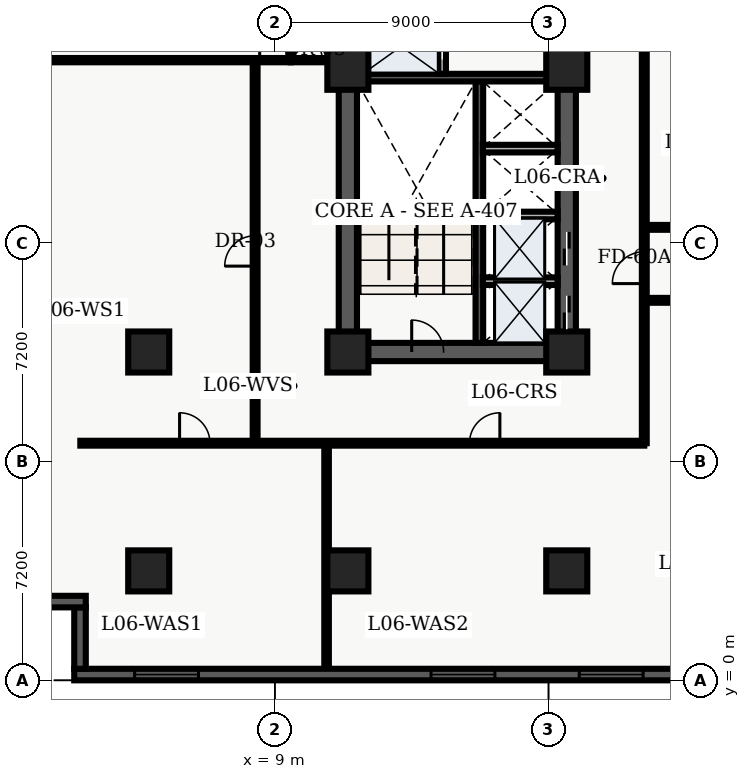
"""IFC4 building model, lengths in metres.
Left out: names, types, materials, properties, quantities, classifications, styles, units other than length and angle.
Written with IfcOpenShell. Run it as: python <this file> out.ifc"""

import sys

from ifc_helpers import new_model, entity, si_unit, converted_unit, direction, frame, origin_with_axes, origin_2d_with_axis, place, context, subcontext, project, spatial, polyline, rectangle, outline, extrude, element, fill, save


model = new_model("IFC4")
c1 = context("Model", 3, precision=1e-05, world=origin_with_axes(), true_north=direction((0.0, 1.0)))
c2 = subcontext(c1, "Body", "Model", "MODEL_VIEW")
j1 = project(units=[si_unit("LENGTHUNIT", "METRE"), converted_unit("PLANEANGLEUNIT", "DEGREE", entity("IfcPlaneAngleMeasure", 0.017), si_unit("PLANEANGLEUNIT", "RADIAN"), dimensions=[0, 0, 0, 0, 0, 0, 0])], contexts=[c1])
p1 = place(None, origin_with_axes())
s1 = spatial("IfcSite", under=j1, at=p1, CompositionType="ELEMENT")
p2 = place(p1, origin_with_axes())
s2 = spatial("IfcBuilding", under=s1, at=p2, CompositionType="ELEMENT")
p3 = place(p2, frame((0.0, 0.0, 28.8), z_axis=(0.0, 0.0, 1.0), x_axis=(1.0, 0.0, 0.0)))
s3 = spatial("IfcBuildingStorey", under=s2, at=p3, CompositionType="ELEMENT", Elevation=28.8)
p4 = place(p3, frame((11.4, 10.8, 0.0), z_axis=(0.0, 0.0, 1.0), x_axis=(0.0, 1.0, 0.0)))
e1 = element("IfcWall", 1, at=p4, inside=s3, PredefinedType="SHEAR", context=c2, shape_type="SweptSolid", body=[
    extrude(outline(polyline([(0.0, -0.3), (27.0, -0.3), (27.0, 0.3), (0.0, 0.3), (0.0, -0.3)])), origin_with_axes(), (0.0, 0.0, 1.0), 3.66),
])
p5 = place(p3, frame((11.4, 10.8, 0.0), z_axis=(0.0, 0.0, 1.0), x_axis=(1.0, 0.0, 0.0)))
e2 = element("IfcWall", 2, at=p5, inside=s3, PredefinedType="SHEAR", context=c2, shape_type="SweptSolid", body=[
    extrude(outline(polyline([(0.0, -0.3), (7.2, -0.3), (7.2, 0.3), (0.0, 0.3), (0.0, -0.3)])), origin_with_axes(), (0.0, 0.0, 1.0), 3.66),
])
p6 = place(p5, frame((2.625, 0.0, 0.0), z_axis=(0.0, 0.0, 1.0), x_axis=(1.0, 0.0, 0.0)))
e3 = element("IfcOpeningElement", 3, at=p6, cuts=e2, PredefinedType="OPENING", context=c2, shape_type="SweptSolid", body=[
    extrude(rectangle(XDim=1.05, YDim=0.62, at=origin_2d_with_axis()), origin_with_axes(), (0.0, 0.0, 1.0), 2.15),
])
p7 = place(p3, frame((18.6, 10.8, 0.0), z_axis=(0.0, 0.0, 1.0), x_axis=(0.0, 1.0, 0.0)))
e4 = element("IfcWall", 4, at=p7, inside=s3, PredefinedType="SHEAR", context=c2, shape_type="SweptSolid", body=[
    extrude(outline(polyline([(0.0, -0.3), (13.5, -0.3), (13.5, 0.3), (0.0, 0.3), (0.0, -0.3)])), origin_with_axes(), (0.0, 0.0, 1.0), 3.66),
])
p8 = place(p7, frame((1.3, 0.0, 0.0), z_axis=(0.0, 0.0, 1.0), x_axis=(1.0, 0.0, 0.0)))
e5 = element("IfcOpeningElement", 5, at=p8, cuts=e4, PredefinedType="OPENING", context=c2, shape_type="SweptSolid", body=[
    extrude(rectangle(XDim=1.1, YDim=0.62, at=origin_2d_with_axis()), origin_with_axes(), (0.0, 0.0, 1.0), 2.15),
])
p9 = place(p7, frame((3.4, 0.0, 0.0), z_axis=(0.0, 0.0, 1.0), x_axis=(1.0, 0.0, 0.0)))
e6 = element("IfcOpeningElement", 6, at=p9, cuts=e4, PredefinedType="OPENING", context=c2, shape_type="SweptSolid", body=[
    extrude(rectangle(XDim=1.1, YDim=0.62, at=origin_2d_with_axis()), origin_with_axes(), (0.0, 0.0, 1.0), 2.15),
])
p10 = place(p7, frame((11.125, 0.0, 0.0), z_axis=(0.0, 0.0, 1.0), x_axis=(1.0, 0.0, 0.0)))
e7 = element("IfcOpeningElement", 7, at=p10, cuts=e4, PredefinedType="OPENING", context=c2, shape_type="SweptSolid", body=[
    extrude(rectangle(XDim=1.05, YDim=0.62, at=origin_2d_with_axis()), origin_with_axes(), (0.0, 0.0, 1.0), 2.15),
])
p11 = place(p3, frame((15.725, 11.1, 0.0), z_axis=(0.0, 0.0, 1.0), x_axis=(0.0, 1.0, 0.0)))
e8 = element("IfcWall", 8, at=p11, inside=s3, PredefinedType="SHEAR", context=c2, shape_type="SweptSolid", body=[
    extrude(outline(polyline([(0.0, -0.125), (8.6, -0.125), (8.6, 0.125), (0.0, 0.125), (0.0, -0.125)])), origin_with_axes(), (0.0, 0.0, 1.0), 3.66),
])
p12 = place(p3, frame((11.7, 19.825, 0.0), z_axis=(0.0, 0.0, 1.0), x_axis=(1.0, 0.0, 0.0)))
e9 = element("IfcWall", 9, at=p12, inside=s3, PredefinedType="SHEAR", context=c2, shape_type="SweptSolid", body=[
    extrude(outline(polyline([(0.0, -0.125), (6.6, -0.125), (6.6, 0.125), (0.0, 0.125), (0.0, -0.125)])), origin_with_axes(), (0.0, 0.0, 1.0), 3.66),
])
p13 = place(p3, frame((14.5, 19.95, 0.0), z_axis=(0.0, 0.0, 1.0), x_axis=(0.0, 1.0, 0.0)))
e10 = element("IfcWall", 10, at=p13, inside=s3, PredefinedType="SOLIDWALL", context=c2, shape_type="SweptSolid", body=[
    extrude(outline(polyline([(0.0, -0.125), (6.25, -0.125), (6.25, 0.125), (0.0, 0.125), (0.0, -0.125)])), origin_with_axes(), (0.0, 0.0, 1.0), 2.7),
])
p14 = place(p13, frame((1.025, 0.0, 0.0), z_axis=(0.0, 0.0, 1.0), x_axis=(1.0, 0.0, 0.0)))
e11 = element("IfcOpeningElement", 11, at=p14, cuts=e10, PredefinedType="OPENING", context=c2, shape_type="SweptSolid", body=[
    extrude(rectangle(XDim=1.1, YDim=0.27, at=origin_2d_with_axis()), origin_with_axes(), (0.0, 0.0, 1.0), 2.15),
])
p15 = place(p13, frame((2.975, 0.0, 0.0), z_axis=(0.0, 0.0, 1.0), x_axis=(1.0, 0.0, 0.0)))
e12 = element("IfcOpeningElement", 12, at=p15, cuts=e10, PredefinedType="OPENING", context=c2, shape_type="SweptSolid", body=[
    extrude(rectangle(XDim=1.1, YDim=0.27, at=origin_2d_with_axis()), origin_with_axes(), (0.0, 0.0, 1.0), 2.15),
])
p16 = place(p13, frame((5.425, 0.0, 0.0), z_axis=(0.0, 0.0, 1.0), x_axis=(1.0, 0.0, 0.0)))
e13 = element("IfcOpeningElement", 13, at=p16, cuts=e10, PredefinedType="OPENING", context=c2, shape_type="SweptSolid", body=[
    extrude(rectangle(XDim=1.2, YDim=0.27, at=origin_2d_with_axis()), origin_with_axes(), (0.0, 0.0, 1.0), 2.15),
])
for number, where, z_axis, x_axis in (
    (14, (11.4, 3.6, 0.0), (0.0, 0.0, 1.0), (1.0, 0.0, 0.0)),
    (15, (11.4, 10.8, 0.0), (0.0, 0.0, 1.0), (1.0, 0.0, 0.0)),
    (16, (11.4, 20.1, 0.0), (0.0, 0.0, 1.0), (1.0, 0.0, 0.0)),
    (17, (18.6, 3.6, 0.0), (0.0, 0.0, 1.0), (1.0, 0.0, 0.0)),
    (18, (18.6, 10.8, 0.0), (0.0, 0.0, 1.0), (1.0, 0.0, 0.0)),
    (19, (18.6, 20.1, 0.0), (0.0, 0.0, 1.0), (1.0, 0.0, 0.0)),
    (20, (4.85, 3.6, 0.0), (0.0, 0.0, 1.0), (1.0, 0.0, 0.0)),
    (21, (4.85, 10.8, 0.0), (0.0, 0.0, 1.0), (1.0, 0.0, 0.0)),
):
    element("IfcColumn", number, at=place(p3, frame(where, z_axis=z_axis, x_axis=x_axis)), inside=s3, PredefinedType="COLUMN", context=c2, shape_type="SweptSolid", body=[
        extrude(rectangle(XDim=1.35, YDim=1.35, at=origin_2d_with_axis()), origin_with_axes(), (0.0, 0.0, 1.0), 3.9),
    ])
for number, where, z_axis, x_axis in (
    (22, (15.84, 13.13, 0.0), (0.0, 0.0, 1.0), (1.0, 0.0, 0.0)),
    (23, (15.84, 15.29, 0.0), (0.0, 0.0, 1.0), (1.0, 0.0, 0.0)),
    (24, (15.84, 17.49, 0.0), (0.0, 0.0, 1.0), (1.0, 0.0, 0.0)),
):
    element("IfcWall", number, at=place(p3, frame(where, z_axis=z_axis, x_axis=x_axis)), inside=s3, PredefinedType="SOLIDWALL", context=c2, shape_type="SweptSolid", body=[
        extrude(outline(polyline([(0.0, -0.125), (2.46, -0.125), (2.46, 0.125), (0.0, 0.125), (0.0, -0.125)])), origin_with_axes(), (0.0, 0.0, 1.0), 2.7),
    ])
p17 = place(p3, frame((9.52, 20.4, 0.0), z_axis=(0.0, 0.0, 1.0), x_axis=(0.0, 1.0, 0.0)))
e25 = element("IfcWall", 25, at=p17, inside=s3, PredefinedType="PARTITIONING", context=c2, shape_type="SweptSolid", body=[
    extrude(outline(polyline([(0.0, -0.07), (4.0, -0.07), (4.0, 0.07), (0.0, 0.07), (0.0, -0.07)])), origin_with_axes(), (0.0, 0.0, 1.0), 2.7),
])
p18 = place(p3, frame((9.52, 20.4, 0.0), z_axis=(0.0, 0.0, 1.0), x_axis=(1.0, 0.0, 0.0)))
e26 = element("IfcWall", 26, at=p18, inside=s3, PredefinedType="PARTITIONING", context=c2, shape_type="SweptSolid", body=[
    extrude(outline(polyline([(0.0, -0.07), (1.58, -0.07), (1.58, 0.07), (0.0, 0.07), (0.0, -0.07)])), origin_with_axes(), (0.0, 0.0, 1.0), 2.7),
])
p19 = place(p18, frame((0.59, 0.0, 0.0), z_axis=(0.0, 0.0, 1.0), x_axis=(1.0, 0.0, 0.0)))
e27 = element("IfcOpeningElement", 27, at=p19, cuts=e26, PredefinedType="OPENING", context=c2, shape_type="SweptSolid", body=[
    extrude(rectangle(XDim=0.9, YDim=0.16, at=origin_2d_with_axis()), origin_with_axes(), (0.0, 0.0, 1.0), 2.15),
])
p20 = place(p3, frame((2.6, 7.8, 0.0), z_axis=(0.0, 0.0, 1.0), x_axis=(1.0, 0.0, 0.0)))
e28 = element("IfcWall", 28, at=p20, inside=s3, PredefinedType="PARTITIONING", context=c2, shape_type="SweptSolid", body=[
    extrude(outline(polyline([(0.0, -0.08), (18.55, -0.08), (18.55, 0.08), (0.0, 0.08), (0.0, -0.08)])), origin_with_axes(), (0.0, 0.0, 1.0), 2.7),
])
p21 = place(p20, frame((3.765, 0.0, 0.0), z_axis=(0.0, 0.0, 1.0), x_axis=(1.0, 0.0, 0.0)))
e29 = element("IfcOpeningElement", 29, at=p21, cuts=e28, PredefinedType="OPENING", context=c2, shape_type="SweptSolid", body=[
    extrude(rectangle(XDim=1.0, YDim=0.18, at=origin_2d_with_axis()), origin_with_axes(), (0.0, 0.0, 1.0), 2.15),
])
p22 = place(p20, frame((13.3, 0.0, 0.0), z_axis=(0.0, 0.0, 1.0), x_axis=(1.0, 0.0, 0.0)))
e30 = element("IfcOpeningElement", 30, at=p22, cuts=e28, PredefinedType="OPENING", context=c2, shape_type="SweptSolid", body=[
    extrude(rectangle(XDim=1.0, YDim=0.18, at=origin_2d_with_axis()), origin_with_axes(), (0.0, 0.0, 1.0), 2.15),
])
p23 = place(p3, frame((21.15, 7.8, 0.0), z_axis=(0.0, 0.0, 1.0), x_axis=(0.0, 1.0, 0.0)))
e31 = element("IfcWall", 31, at=p23, inside=s3, PredefinedType="PARTITIONING", context=c2, shape_type="SweptSolid", body=[
    extrude(outline(polyline([(0.0, -0.08), (30.2, -0.08), (30.2, 0.08), (0.0, 0.08), (0.0, -0.08)])), origin_with_axes(), (0.0, 0.0, 1.0), 2.7),
])
p24 = place(p23, frame((5.775, 0.0, 0.0), z_axis=(0.0, 0.0, 1.0), x_axis=(1.0, 0.0, 0.0)))
e32 = element("IfcOpeningElement", 32, at=p24, cuts=e31, PredefinedType="OPENING", context=c2, shape_type="SweptSolid", body=[
    extrude(rectangle(XDim=1.05, YDim=0.18, at=origin_2d_with_axis()), origin_with_axes(), (0.0, 0.0, 1.0), 2.15),
])
p25 = place(p3, frame((8.35, 7.8, 0.0), z_axis=(0.0, 0.0, 1.0), x_axis=(0.0, 1.0, 0.0)))
e33 = element("IfcWall", 33, at=p25, inside=s3, PredefinedType="PARTITIONING", context=c2, shape_type="SweptSolid", body=[
    extrude(outline(polyline([(0.0, -0.08), (12.6, -0.08), (12.6, 0.08), (0.0, 0.08), (0.0, -0.08)])), origin_with_axes(), (0.0, 0.0, 1.0), 2.7),
])
p26 = place(p25, frame((6.325, 0.0, 0.0), z_axis=(0.0, 0.0, 1.0), x_axis=(1.0, 0.0, 0.0)))
e34 = element("IfcOpeningElement", 34, at=p26, cuts=e33, PredefinedType="OPENING", context=c2, shape_type="SweptSolid", body=[
    extrude(rectangle(XDim=1.0, YDim=0.18, at=origin_2d_with_axis()), origin_with_axes(), (0.0, 0.0, 1.0), 2.15),
])
p27 = place(p3, frame((0.36, 20.4, 0.0), z_axis=(0.0, 0.0, 1.0), x_axis=(1.0, 0.0, 0.0)))
e35 = element("IfcWall", 35, at=p27, inside=s3, PredefinedType="PARTITIONING", context=c2, shape_type="SweptSolid", body=[
    extrude(outline(polyline([(0.0, -0.07), (9.16, -0.07), (9.16, 0.07), (0.0, 0.07), (0.0, -0.07)])), origin_with_axes(), (0.0, 0.0, 1.0), 2.7),
])
p28 = place(p27, frame((8.59, 0.0, 0.0), z_axis=(0.0, 0.0, 1.0), x_axis=(1.0, 0.0, 0.0)))
e36 = element("IfcOpeningElement", 36, at=p28, cuts=e35, PredefinedType="OPENING", context=c2, shape_type="SweptSolid", body=[
    extrude(rectangle(XDim=0.9, YDim=0.16, at=origin_2d_with_axis()), origin_with_axes(), (0.0, 0.0, 1.0), 2.15),
])
p29 = place(p3, frame((10.7, 0.36, 0.0), z_axis=(0.0, 0.0, 1.0), x_axis=(0.0, 1.0, 0.0)))
e37 = element("IfcWall", 37, at=p29, inside=s3, PredefinedType="PARTITIONING", context=c2, shape_type="SweptSolid", body=[
    extrude(outline(polyline([(0.0, -0.075), (7.34, -0.075), (7.34, 0.075), (0.0, 0.075), (0.0, -0.075)])), origin_with_axes(), (0.0, 0.0, 1.0), 2.7),
])
p30 = place(p3, frame((21.15, 12.5, 0.0), z_axis=(0.0, 0.0, 1.0), x_axis=(1.0, 0.0, 0.0)))
e38 = element("IfcWall", 38, at=p30, inside=s3, PredefinedType="PARTITIONING", context=c2, shape_type="SweptSolid", body=[
    extrude(outline(polyline([(0.0, -0.08), (15.2, -0.08), (15.2, 0.08), (0.0, 0.08), (0.0, -0.08)])), origin_with_axes(), (0.0, 0.0, 1.0), 2.7),
])
p31 = place(p30, frame((3.508, 0.0, 0.0), z_axis=(0.0, 0.0, 1.0), x_axis=(1.0, 0.0, 0.0)))
e39 = element("IfcOpeningElement", 39, at=p31, cuts=e38, PredefinedType="OPENING", context=c2, shape_type="SweptSolid", body=[
    extrude(rectangle(XDim=1.0, YDim=0.18, at=origin_2d_with_axis()), origin_with_axes(), (0.0, 0.0, 1.0), 2.15),
])
p32 = place(p30, frame((10.978, 0.0, 0.0), z_axis=(0.0, 0.0, 1.0), x_axis=(1.0, 0.0, 0.0)))
e40 = element("IfcOpeningElement", 40, at=p32, cuts=e38, PredefinedType="OPENING", context=c2, shape_type="SweptSolid", body=[
    extrude(rectangle(XDim=1.2, YDim=0.18, at=origin_2d_with_axis()), origin_with_axes(), (0.0, 0.0, 1.0), 2.2),
])
p33 = place(p3, frame((21.15, 14.9, 0.0), z_axis=(0.0, 0.0, 1.0), x_axis=(1.0, 0.0, 0.0)))
e41 = element("IfcWall", 41, at=p33, inside=s3, PredefinedType="PARTITIONING", context=c2, shape_type="SweptSolid", body=[
    extrude(outline(polyline([(0.0, -0.08), (15.2, -0.08), (15.2, 0.08), (0.0, 0.08), (0.0, -0.08)])), origin_with_axes(), (0.0, 0.0, 1.0), 2.7),
])
p34 = place(p33, frame((3.49, 0.0, 0.0), z_axis=(0.0, 0.0, 1.0), x_axis=(1.0, 0.0, 0.0)))
e42 = element("IfcOpeningElement", 42, at=p34, cuts=e41, PredefinedType="OPENING", context=c2, shape_type="SweptSolid", body=[
    extrude(rectangle(XDim=1.0, YDim=0.18, at=origin_2d_with_axis()), origin_with_axes(), (0.0, 0.0, 1.0), 2.15),
])
p35 = place(p33, frame((10.96, 0.0, 0.0), z_axis=(0.0, 0.0, 1.0), x_axis=(1.0, 0.0, 0.0)))
e43 = element("IfcOpeningElement", 43, at=p35, cuts=e41, PredefinedType="OPENING", context=c2, shape_type="SweptSolid", body=[
    extrude(rectangle(XDim=1.0, YDim=0.18, at=origin_2d_with_axis()), origin_with_axes(), (0.0, 0.0, 1.0), 2.15),
])
p36 = place(p3, frame((57.22, 0.19, 0.0), z_axis=(0.0, 0.0, 1.0), x_axis=(-1.0, 0.0, 0.0)))
e44 = element("IfcWall", 44, at=p36, inside=s3, PredefinedType="SOLIDWALL", context=c2, shape_type="SweptSolid", body=[
    extrude(outline(polyline([(0.0, -0.19), (54.82, -0.19), (54.82, 0.19), (0.0, 0.19), (0.0, -0.19)])), origin_with_axes(), (0.0, 0.0, 1.0), 3.66),
])
p37 = place(p36, frame((3.037, 0.0, 0.45), z_axis=(0.0, 0.0, 1.0), x_axis=(1.0, 0.0, 0.0)))
e45 = element("IfcOpeningElement", 45, at=p37, cuts=e44, PredefinedType="OPENING", context=c2, shape_type="SweptSolid", body=[
    extrude(rectangle(XDim=2.1, YDim=0.4, at=origin_2d_with_axis()), origin_with_axes(), (0.0, 0.0, 1.0), 2.2),
])
p38 = place(p36, frame((7.912, 0.0, 0.45), z_axis=(0.0, 0.0, 1.0), x_axis=(1.0, 0.0, 0.0)))
e46 = element("IfcOpeningElement", 46, at=p38, cuts=e44, PredefinedType="OPENING", context=c2, shape_type="SweptSolid", body=[
    extrude(rectangle(XDim=2.1, YDim=0.4, at=origin_2d_with_axis()), origin_with_axes(), (0.0, 0.0, 1.0), 2.2),
])
p39 = place(p36, frame((12.786, 0.0, 0.45), z_axis=(0.0, 0.0, 1.0), x_axis=(1.0, 0.0, 0.0)))
e47 = element("IfcOpeningElement", 47, at=p39, cuts=e44, PredefinedType="OPENING", context=c2, shape_type="SweptSolid", body=[
    extrude(rectangle(XDim=2.1, YDim=0.4, at=origin_2d_with_axis()), origin_with_axes(), (0.0, 0.0, 1.0), 2.2),
])
p40 = place(p36, frame((17.661, 0.0, 0.45), z_axis=(0.0, 0.0, 1.0), x_axis=(1.0, 0.0, 0.0)))
e48 = element("IfcOpeningElement", 48, at=p40, cuts=e44, PredefinedType="OPENING", context=c2, shape_type="SweptSolid", body=[
    extrude(rectangle(XDim=2.1, YDim=0.4, at=origin_2d_with_axis()), origin_with_axes(), (0.0, 0.0, 1.0), 2.2),
])
p41 = place(p36, frame((22.535, 0.0, 0.45), z_axis=(0.0, 0.0, 1.0), x_axis=(1.0, 0.0, 0.0)))
e49 = element("IfcOpeningElement", 49, at=p41, cuts=e44, PredefinedType="OPENING", context=c2, shape_type="SweptSolid", body=[
    extrude(rectangle(XDim=2.1, YDim=0.4, at=origin_2d_with_axis()), origin_with_axes(), (0.0, 0.0, 1.0), 2.2),
])
p42 = place(p36, frame((27.41, 0.0, 0.45), z_axis=(0.0, 0.0, 1.0), x_axis=(1.0, 0.0, 0.0)))
e50 = element("IfcOpeningElement", 50, at=p42, cuts=e44, PredefinedType="OPENING", context=c2, shape_type="SweptSolid", body=[
    extrude(rectangle(XDim=2.1, YDim=0.4, at=origin_2d_with_axis()), origin_with_axes(), (0.0, 0.0, 1.0), 2.2),
])
p43 = place(p36, frame((32.285, 0.0, 0.45), z_axis=(0.0, 0.0, 1.0), x_axis=(1.0, 0.0, 0.0)))
e51 = element("IfcOpeningElement", 51, at=p43, cuts=e44, PredefinedType="OPENING", context=c2, shape_type="SweptSolid", body=[
    extrude(rectangle(XDim=2.1, YDim=0.4, at=origin_2d_with_axis()), origin_with_axes(), (0.0, 0.0, 1.0), 2.2),
])
p44 = place(p36, frame((37.159, 0.0, 0.45), z_axis=(0.0, 0.0, 1.0), x_axis=(1.0, 0.0, 0.0)))
e52 = element("IfcOpeningElement", 52, at=p44, cuts=e44, PredefinedType="OPENING", context=c2, shape_type="SweptSolid", body=[
    extrude(rectangle(XDim=2.1, YDim=0.4, at=origin_2d_with_axis()), origin_with_axes(), (0.0, 0.0, 1.0), 2.2),
])
p45 = place(p36, frame((42.034, 0.0, 0.45), z_axis=(0.0, 0.0, 1.0), x_axis=(1.0, 0.0, 0.0)))
e53 = element("IfcOpeningElement", 53, at=p45, cuts=e44, PredefinedType="OPENING", context=c2, shape_type="SweptSolid", body=[
    extrude(rectangle(XDim=2.1, YDim=0.4, at=origin_2d_with_axis()), origin_with_axes(), (0.0, 0.0, 1.0), 2.2),
])
p46 = place(p36, frame((51.783, 0.0, 0.45), z_axis=(0.0, 0.0, 1.0), x_axis=(1.0, 0.0, 0.0)))
e54 = element("IfcOpeningElement", 54, at=p46, cuts=e44, PredefinedType="OPENING", context=c2, shape_type="SweptSolid", body=[
    extrude(rectangle(XDim=2.1, YDim=0.4, at=origin_2d_with_axis()), origin_with_axes(), (0.0, 0.0, 1.0), 2.2),
])
p47 = place(p3, frame((2.59, 0.38, 0.0), z_axis=(0.0, 0.0, 1.0), x_axis=(0.0, 1.0, 0.0)))
e55 = element("IfcWall", 55, at=p47, inside=s3, PredefinedType="SOLIDWALL", context=c2, shape_type="SweptSolid", body=[
    extrude(outline(polyline([(0.0, -0.19), (2.02, -0.19), (2.02, 0.19), (0.0, 0.19), (0.0, -0.19)])), origin_with_axes(), (0.0, 0.0, 1.0), 3.66),
])
p48 = place(p3, frame((2.78, 2.59, 0.0), z_axis=(0.0, 0.0, 1.0), x_axis=(-1.0, 0.0, 0.0)))
e56 = element("IfcWall", 56, at=p48, inside=s3, PredefinedType="SOLIDWALL", context=c2, shape_type="SweptSolid", body=[
    extrude(outline(polyline([(0.0, -0.19), (2.78, -0.19), (2.78, 0.19), (0.0, 0.19), (0.0, -0.19)])), origin_with_axes(), (0.0, 0.0, 1.0), 3.66),
])
p49 = place(p7, frame((1.3, 0.0, 0.0), z_axis=(0.0, 0.0, 1.0), x_axis=(1.0, 0.0, 0.0)))
e57 = element("IfcDoor", 57, at=p49, inside=s3, OperationType="SLIDING_TO_LEFT", PredefinedType="DOOR", context=c2, shape_type="SweptSolid", body=[
    extrude(rectangle(XDim=1.1, YDim=0.09, at=origin_2d_with_axis()), origin_with_axes(), (0.0, 0.0, 1.0), 2.15),
])
fill(e5, e57)
p50 = place(p7, frame((3.4, 0.0, 0.0), z_axis=(0.0, 0.0, 1.0), x_axis=(1.0, 0.0, 0.0)))
e58 = element("IfcDoor", 58, at=p50, inside=s3, OperationType="SLIDING_TO_RIGHT", PredefinedType="DOOR", context=c2, shape_type="SweptSolid", body=[
    extrude(rectangle(XDim=1.1, YDim=0.09, at=origin_2d_with_axis()), origin_with_axes(), (0.0, 0.0, 1.0), 2.15),
])
fill(e6, e58)
p51 = place(p13, frame((1.025, 0.0, 0.0), z_axis=(0.0, 0.0, 1.0), x_axis=(1.0, 0.0, 0.0)))
e59 = element("IfcDoor", 59, at=p51, inside=s3, OperationType="SLIDING_TO_LEFT", PredefinedType="DOOR", context=c2, shape_type="SweptSolid", body=[
    extrude(rectangle(XDim=1.1, YDim=0.09, at=origin_2d_with_axis()), origin_with_axes(), (0.0, 0.0, 1.0), 2.15),
])
fill(e11, e59)
p52 = place(p5, frame((2.625, 0.0, 0.0), z_axis=(0.0, 0.0, 1.0), x_axis=(1.0, 0.0, 0.0)))
e60 = element("IfcDoor", 60, at=p52, inside=s3, OperationType="SINGLE_SWING_LEFT", PredefinedType="DOOR", context=c2, shape_type="SweptSolid", body=[
    extrude(rectangle(XDim=1.05, YDim=0.09, at=origin_2d_with_axis()), origin_with_axes(), (0.0, 0.0, 1.0), 2.15),
])
fill(e3, e60)
p53 = place(p18, frame((0.59, 0.0, 0.0), z_axis=(0.0, 0.0, 1.0), x_axis=(1.0, 0.0, 0.0)))
e61 = element("IfcDoor", 61, at=p53, inside=s3, OperationType="SINGLE_SWING_LEFT", PredefinedType="DOOR", context=c2, shape_type="SweptSolid", body=[
    extrude(rectangle(XDim=0.9, YDim=0.084, at=origin_2d_with_axis()), origin_with_axes(), (0.0, 0.0, 1.0), 2.15),
])
fill(e27, e61)
p54 = place(p27, frame((8.59, 0.0, 0.0), z_axis=(0.0, 0.0, 1.0), x_axis=(1.0, 0.0, 0.0)))
e62 = element("IfcDoor", 62, at=p54, inside=s3, OperationType="SINGLE_SWING_LEFT", PredefinedType="DOOR", context=c2, shape_type="SweptSolid", body=[
    extrude(rectangle(XDim=0.9, YDim=0.084, at=origin_2d_with_axis()), origin_with_axes(), (0.0, 0.0, 1.0), 2.15),
])
fill(e36, e62)
p55 = place(p25, frame((6.325, 0.0, 0.0), z_axis=(0.0, 0.0, 1.0), x_axis=(1.0, 0.0, 0.0)))
e63 = element("IfcDoor", 63, at=p55, inside=s3, OperationType="SINGLE_SWING_LEFT", PredefinedType="DOOR", context=c2, shape_type="SweptSolid", body=[
    extrude(rectangle(XDim=1.0, YDim=0.09, at=origin_2d_with_axis()), origin_with_axes(), (0.0, 0.0, 1.0), 2.15),
])
fill(e34, e63)
p56 = place(p20, frame((3.765, 0.0, 0.0), z_axis=(0.0, 0.0, 1.0), x_axis=(1.0, 0.0, 0.0)))
e64 = element("IfcDoor", 64, at=p56, inside=s3, OperationType="SINGLE_SWING_LEFT", PredefinedType="DOOR", context=c2, shape_type="SweptSolid", body=[
    extrude(rectangle(XDim=1.0, YDim=0.09, at=origin_2d_with_axis()), origin_with_axes(), (0.0, 0.0, 1.0), 2.15),
])
fill(e29, e64)
p57 = place(p20, frame((13.3, 0.0, 0.0), z_axis=(0.0, 0.0, 1.0), x_axis=(1.0, 0.0, 0.0)))
e65 = element("IfcDoor", 65, at=p57, inside=s3, OperationType="SINGLE_SWING_RIGHT", PredefinedType="DOOR", context=c2, shape_type="SweptSolid", body=[
    extrude(rectangle(XDim=1.0, YDim=0.09, at=origin_2d_with_axis()), origin_with_axes(), (0.0, 0.0, 1.0), 2.15),
])
fill(e30, e65)
p58 = place(p23, frame((5.775, 0.0, 0.0), z_axis=(0.0, 0.0, 1.0), x_axis=(1.0, 0.0, 0.0)))
e66 = element("IfcDoor", 66, at=p58, inside=s3, OperationType="SINGLE_SWING_LEFT", PredefinedType="DOOR", context=c2, shape_type="SweptSolid", body=[
    extrude(rectangle(XDim=1.05, YDim=0.09, at=origin_2d_with_axis()), origin_with_axes(), (0.0, 0.0, 1.0), 2.15),
])
fill(e32, e66)
p59 = place(p36, frame((37.159, 0.0, 0.45), z_axis=(0.0, 0.0, 1.0), x_axis=(1.0, 0.0, 0.0)))
e67 = element("IfcWindow", 67, at=p59, inside=s3, PredefinedType="WINDOW", context=c2, shape_type="SweptSolid", body=[
    extrude(rectangle(XDim=2.1, YDim=0.09, at=origin_2d_with_axis()), origin_with_axes(), (0.0, 0.0, 1.0), 2.2),
])
fill(e52, e67)
p60 = place(p36, frame((42.034, 0.0, 0.45), z_axis=(0.0, 0.0, 1.0), x_axis=(1.0, 0.0, 0.0)))
e68 = element("IfcWindow", 68, at=p60, inside=s3, PredefinedType="WINDOW", context=c2, shape_type="SweptSolid", body=[
    extrude(rectangle(XDim=2.1, YDim=0.09, at=origin_2d_with_axis()), origin_with_axes(), (0.0, 0.0, 1.0), 2.2),
])
fill(e53, e68)
p61 = place(p36, frame((51.783, 0.0, 0.45), z_axis=(0.0, 0.0, 1.0), x_axis=(1.0, 0.0, 0.0)))
e69 = element("IfcWindow", 69, at=p61, inside=s3, PredefinedType="WINDOW", context=c2, shape_type="SweptSolid", body=[
    extrude(rectangle(XDim=2.1, YDim=0.09, at=origin_2d_with_axis()), origin_with_axes(), (0.0, 0.0, 1.0), 2.2),
])
fill(e54, e69)
save(model, sys.argv[1])
